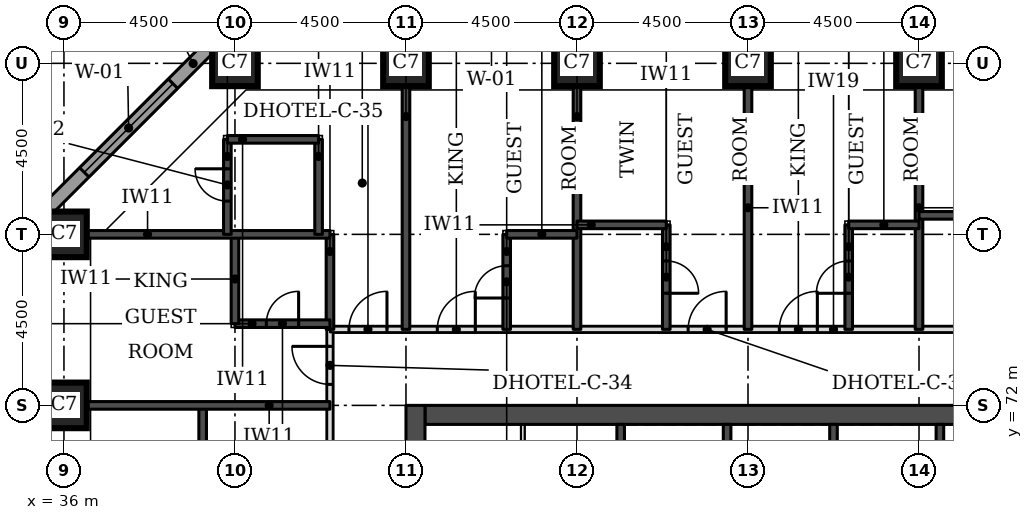
"""IFC4 building model, lengths in metres.
Left out: names, types, materials, properties, quantities, classifications, styles, units other than length and angle.
Written with IfcOpenShell. Run it as: python <this file> out.ifc"""

import sys

from ifc_helpers import new_model, si_unit, direction, frame, frame_2d, origin, origin_2d, place, context, subcontext, project, spatial, rectangle, extrude, element, fill, save


model = new_model("IFC4")
c1 = context("Model", 3, precision=1e-05, world=origin(), true_north=direction((0.0, 1.0)))
c2 = subcontext(c1, "Body", "Model", "MODEL_VIEW")
j1 = project(units=[si_unit("LENGTHUNIT", "METRE"), si_unit("PLANEANGLEUNIT", "RADIAN")], contexts=[c1])
p1 = place(None, origin())
s1 = spatial("IfcSite", under=j1, at=p1, CompositionType="ELEMENT")
p2 = place(p1, origin())
s2 = spatial("IfcBuilding", under=s1, at=p2, CompositionType="ELEMENT")
p3 = place(p2, frame((0.0, 0.0, 56.1)))
s3 = spatial("IfcBuildingStorey", under=s2, at=p3, CompositionType="ELEMENT", Elevation=56.1)
for number, where, z_axis, x_axis in (
    (1, (36.0, 72.0, 0.0), (0.0, 0.0, 1.0), (1.0, 0.0, 0.0)),
    (2, (36.0, 76.5, 0.0), (0.0, 0.0, 1.0), (1.0, 0.0, 0.0)),
    (3, (40.5, 81.0, 0.0), (0.0, 0.0, 1.0), (1.0, 0.0, 0.0)),
    (4, (45.0, 81.0, 0.0), (0.0, 0.0, 1.0), (1.0, 0.0, 0.0)),
    (5, (49.5, 81.0, 0.0), (0.0, 0.0, 1.0), (1.0, 0.0, 0.0)),
    (6, (54.0, 81.0, 0.0), (0.0, 0.0, 1.0), (1.0, 0.0, 0.0)),
    (7, (58.5, 81.0, 0.0), (0.0, 0.0, 1.0), (1.0, 0.0, 0.0)),
):
    element("IfcColumn", number, at=place(p3, frame(where, z_axis=z_axis, x_axis=x_axis)), inside=s3, PredefinedType="COLUMN", context=c2, shape_type="SweptSolid", body=[
        extrude(rectangle(XDim=1.2, YDim=1.2, at=origin_2d()), origin(), (0.0, 0.0, 1.0), 3.3),
    ])
p4 = place(p3, frame((45.5, 71.75, 0.0), z_axis=(0.0, 0.0, 1.0), x_axis=(1.0, 0.0, 0.0)))
e8 = element("IfcWall", 8, at=p4, inside=s3, PredefinedType="SHEAR", context=c2, shape_type="SweptSolid", body=[
    extrude(rectangle(XDim=21.5, YDim=0.5, at=frame_2d((10.75, 0.0))), origin(), (0.0, 0.0, 1.0), 3.3),
])
p5 = place(p3, frame((45.25, 49.5, 0.0), z_axis=(0.0, 0.0, 1.0), x_axis=(0.0, 1.0, 0.0)))
e9 = element("IfcWall", 9, at=p5, inside=s3, PredefinedType="SHEAR", context=c2, shape_type="SweptSolid", body=[
    extrude(rectangle(XDim=22.5, YDim=0.5, at=frame_2d((11.25, 0.0))), origin(), (0.0, 0.0, 1.0), 3.3),
])
p6 = place(p5, frame((4.2, 0.0, 0.0)))
e10 = element("IfcOpeningElement", 10, at=p6, cuts=e9, PredefinedType="OPENING", context=c2, shape_type="SweptSolid", body=[
    extrude(rectangle(XDim=1.8, YDim=2.1, at=frame_2d((0.9, 1.05))), frame((0.0, 0.26, 0.0), z_axis=(0.0, -1.0, 0.0), x_axis=(1.0, 0.0, 0.0)), (0.0, 0.0, 1.0), 0.52),
])
p7 = place(p5, frame((6.9, 0.0, 0.0)))
e11 = element("IfcOpeningElement", 11, at=p7, cuts=e9, PredefinedType="OPENING", context=c2, shape_type="SweptSolid", body=[
    extrude(rectangle(XDim=1.1, YDim=2.1, at=frame_2d((0.55, 1.05))), frame((0.0, 0.26, 0.0), z_axis=(0.0, -1.0, 0.0), x_axis=(1.0, 0.0, 0.0)), (0.0, 0.0, 1.0), 0.52),
])
p8 = place(p5, frame((13.6, 0.0, 0.0)))
e12 = element("IfcOpeningElement", 12, at=p8, cuts=e9, PredefinedType="OPENING", context=c2, shape_type="SweptSolid", body=[
    extrude(rectangle(XDim=1.1, YDim=2.1, at=frame_2d((0.55, 1.05))), frame((0.0, 0.26, 0.0), z_axis=(0.0, -1.0, 0.0), x_axis=(1.0, 0.0, 0.0)), (0.0, 0.0, 1.0), 0.52),
])
p9 = place(p5, frame((16.5, 0.0, 0.0)))
e13 = element("IfcOpeningElement", 13, at=p9, cuts=e9, PredefinedType="OPENING", context=c2, shape_type="SweptSolid", body=[
    extrude(rectangle(XDim=1.8, YDim=2.1, at=frame_2d((0.9, 1.05))), frame((0.0, 0.26, 0.0), z_axis=(0.0, -1.0, 0.0), x_axis=(1.0, 0.0, 0.0)), (0.0, 0.0, 1.0), 0.52),
])
p10 = place(p3, frame((40.23, 81.826, 0.0), z_axis=(0.0, 0.0, 1.0), x_axis=(-0.707106781187, -0.707106781187, 0.0)))
e14 = element("IfcWall", 14, at=p10, inside=s3, PredefinedType="STANDARD", context=c2, shape_type="SweptSolid", body=[
    extrude(rectangle(XDim=7.151, YDim=0.35, at=frame_2d((3.576, 0.0))), origin(), (0.0, 0.0, 1.0), 3.055),
])
p11 = place(p10, frame((1.926, 0.0, 0.8)))
e15 = element("IfcOpeningElement", 15, at=p11, cuts=e14, PredefinedType="OPENING", context=c2, shape_type="SweptSolid", body=[
    extrude(rectangle(XDim=3.3, YDim=1.5, at=frame_2d((1.65, 0.75))), frame((0.0, 0.185, 0.0), z_axis=(0.0, -1.0, 0.0), x_axis=(1.0, 0.0, 0.0)), (0.0, 0.0, 1.0), 0.37),
])
p12 = place(p3, frame((43.0, 56.0, 0.0), z_axis=(0.0, 0.0, 1.0), x_axis=(0.0, 1.0, 0.0)))
e16 = element("IfcWall", 16, at=p12, inside=s3, PredefinedType="PARTITIONING", context=c2, shape_type="SweptSolid", body=[
    extrude(rectangle(XDim=18.0, YDim=0.15, at=frame_2d((9.0, 0.0))), origin(), (0.0, 0.0, 1.0), 3.08),
])
p13 = place(p12, frame((9.775, 0.0, 0.0)))
e17 = element("IfcOpeningElement", 17, at=p13, cuts=e16, PredefinedType="OPENING", context=c2, shape_type="SweptSolid", body=[
    extrude(rectangle(XDim=1.0, YDim=2.1, at=frame_2d((0.5, 1.05))), frame((0.0, 0.085, 0.0), z_axis=(0.0, -1.0, 0.0), x_axis=(1.0, 0.0, 0.0)), (0.0, 0.0, 1.0), 0.17),
])
p14 = place(p12, frame((16.553, 0.0, 0.0)))
e18 = element("IfcOpeningElement", 18, at=p14, cuts=e16, PredefinedType="OPENING", context=c2, shape_type="SweptSolid", body=[
    extrude(rectangle(XDim=1.0, YDim=2.1, at=frame_2d((0.5, 1.05))), frame((0.0, 0.085, 0.0), z_axis=(0.0, -1.0, 0.0), x_axis=(1.0, 0.0, 0.0)), (0.0, 0.0, 1.0), 0.17),
])
p15 = place(p12, frame((3.05, 0.0, 0.0)))
e19 = element("IfcOpeningElement", 19, at=p15, cuts=e16, PredefinedType="OPENING", context=c2, shape_type="SweptSolid", body=[
    extrude(rectangle(XDim=0.9, YDim=2.1, at=frame_2d((0.45, 1.05))), frame((0.0, 0.085, 0.0), z_axis=(0.0, -1.0, 0.0), x_axis=(1.0, 0.0, 0.0)), (0.0, 0.0, 1.0), 0.17),
])
p16 = place(p3, frame((43.0, 74.0, 0.0), z_axis=(0.0, 0.0, 1.0), x_axis=(1.0, 0.0, 0.0)))
e20 = element("IfcWall", 20, at=p16, inside=s3, PredefinedType="PARTITIONING", context=c2, shape_type="SweptSolid", body=[
    extrude(rectangle(XDim=26.5, YDim=0.15, at=frame_2d((13.25, 0.0))), origin(), (0.0, 0.0, 1.0), 3.08),
])
p17 = place(p16, frame((2.825, 0.0, 0.0)))
e21 = element("IfcOpeningElement", 21, at=p17, cuts=e20, PredefinedType="OPENING", context=c2, shape_type="SweptSolid", body=[
    extrude(rectangle(XDim=1.0, YDim=2.1, at=frame_2d((0.5, 1.05))), frame((0.0, 0.085, 0.0), z_axis=(0.0, -1.0, 0.0), x_axis=(1.0, 0.0, 0.0)), (0.0, 0.0, 1.0), 0.17),
])
p18 = place(p16, frame((9.425, 0.0, 0.0)))
e22 = element("IfcOpeningElement", 22, at=p18, cuts=e20, PredefinedType="OPENING", context=c2, shape_type="SweptSolid", body=[
    extrude(rectangle(XDim=1.0, YDim=2.1, at=frame_2d((0.5, 1.05))), frame((0.0, 0.085, 0.0), z_axis=(0.0, -1.0, 0.0), x_axis=(1.0, 0.0, 0.0)), (0.0, 0.0, 1.0), 0.17),
])
p19 = place(p16, frame((11.825, 0.0, 0.0)))
e23 = element("IfcOpeningElement", 23, at=p19, cuts=e20, PredefinedType="OPENING", context=c2, shape_type="SweptSolid", body=[
    extrude(rectangle(XDim=1.0, YDim=2.1, at=frame_2d((0.5, 1.05))), frame((0.0, 0.085, 0.0), z_axis=(0.0, -1.0, 0.0), x_axis=(1.0, 0.0, 0.0)), (0.0, 0.0, 1.0), 0.17),
])
p20 = place(p16, frame((18.425, 0.0, 0.0)))
e24 = element("IfcOpeningElement", 24, at=p20, cuts=e20, PredefinedType="OPENING", context=c2, shape_type="SweptSolid", body=[
    extrude(rectangle(XDim=1.0, YDim=2.1, at=frame_2d((0.5, 1.05))), frame((0.0, 0.085, 0.0), z_axis=(0.0, -1.0, 0.0), x_axis=(1.0, 0.0, 0.0)), (0.0, 0.0, 1.0), 0.17),
])
p21 = place(p16, frame((20.825, 0.0, 0.0)))
e25 = element("IfcOpeningElement", 25, at=p21, cuts=e20, PredefinedType="OPENING", context=c2, shape_type="SweptSolid", body=[
    extrude(rectangle(XDim=1.0, YDim=2.1, at=frame_2d((0.5, 1.05))), frame((0.0, 0.085, 0.0), z_axis=(0.0, -1.0, 0.0), x_axis=(1.0, 0.0, 0.0)), (0.0, 0.0, 1.0), 0.17),
])
p22 = place(p16, frame((0.5, 0.0, 0.0)))
e26 = element("IfcOpeningElement", 26, at=p22, cuts=e20, PredefinedType="OPENING", context=c2, shape_type="SweptSolid", body=[
    extrude(rectangle(XDim=1.0, YDim=2.1, at=frame_2d((0.5, 1.05))), frame((0.0, 0.085, 0.0), z_axis=(0.0, -1.0, 0.0), x_axis=(1.0, 0.0, 0.0)), (0.0, 0.0, 1.0), 0.17),
])
p23 = place(p16, frame((25.0, 0.0, 0.0)))
e27 = element("IfcOpeningElement", 27, at=p23, cuts=e20, PredefinedType="OPENING", context=c2, shape_type="SweptSolid", body=[
    extrude(rectangle(XDim=1.0, YDim=2.1, at=frame_2d((0.5, 1.05))), frame((0.0, 0.085, 0.0), z_axis=(0.0, -1.0, 0.0), x_axis=(1.0, 0.0, 0.0)), (0.0, 0.0, 1.0), 0.17),
])
p24 = place(p3, frame((39.65, 69.55, 0.0), z_axis=(0.0, 0.0, 1.0), x_axis=(0.0, 1.0, 0.0)))
e28 = element("IfcWall", 28, at=p24, inside=s3, PredefinedType="SOLIDWALL", context=c2, shape_type="SweptSolid", body=[
    extrude(rectangle(XDim=2.45, YDim=0.2, at=frame_2d((1.225, 0.0))), origin(), (0.0, 0.0, 1.0), 3.08),
])
p25 = place(p3, frame((36.6, 72.0, 0.0), z_axis=(0.0, 0.0, 1.0), x_axis=(1.0, 0.0, 0.0)))
e29 = element("IfcWall", 29, at=p25, inside=s3, PredefinedType="SOLIDWALL", context=c2, shape_type="SweptSolid", body=[
    extrude(rectangle(XDim=6.4, YDim=0.2, at=frame_2d((3.2, 0.0))), origin(), (0.0, 0.0, 1.0), 3.08),
])
p26 = place(p3, frame((43.0, 74.0, 0.0), z_axis=(0.0, 0.0, 1.0), x_axis=(0.0, 1.0, 0.0)))
e30 = element("IfcWall", 30, at=p26, inside=s3, PredefinedType="SOLIDWALL", context=c2, shape_type="SweptSolid", body=[
    extrude(rectangle(XDim=2.5, YDim=0.2, at=frame_2d((1.25, 0.0))), origin(), (0.0, 0.0, 1.0), 3.08),
])
p27 = place(p3, frame((45.0, 74.0, 0.0), z_axis=(0.0, 0.0, 1.0), x_axis=(0.0, 1.0, 0.0)))
e31 = element("IfcWall", 31, at=p27, inside=s3, PredefinedType="SOLIDWALL", context=c2, shape_type="SweptSolid", body=[
    extrude(rectangle(XDim=6.4, YDim=0.2, at=frame_2d((3.2, 0.0))), origin(), (0.0, 0.0, 1.0), 3.08),
])
p28 = place(p3, frame((47.65, 74.0, 0.0), z_axis=(0.0, 0.0, 1.0), x_axis=(0.0, 1.0, 0.0)))
e32 = element("IfcWall", 32, at=p28, inside=s3, PredefinedType="SOLIDWALL", context=c2, shape_type="SweptSolid", body=[
    extrude(rectangle(XDim=2.5, YDim=0.2, at=frame_2d((1.25, 0.0))), origin(), (0.0, 0.0, 1.0), 3.08),
])
p29 = place(p28, frame((0.825, 0.0, 0.0)))
e33 = element("IfcOpeningElement", 33, at=p29, cuts=e32, PredefinedType="OPENING", context=c2, shape_type="SweptSolid", body=[
    extrude(rectangle(XDim=0.85, YDim=2.1, at=frame_2d((0.425, 1.05))), frame((0.0, 0.11, 0.0), z_axis=(0.0, -1.0, 0.0), x_axis=(1.0, 0.0, 0.0)), (0.0, 0.0, 1.0), 0.22),
])
p30 = place(p3, frame((49.5, 74.0, 0.0), z_axis=(0.0, 0.0, 1.0), x_axis=(0.0, 1.0, 0.0)))
e34 = element("IfcWall", 34, at=p30, inside=s3, PredefinedType="SOLIDWALL", context=c2, shape_type="SweptSolid", body=[
    extrude(rectangle(XDim=6.4, YDim=0.2, at=frame_2d((3.2, 0.0))), origin(), (0.0, 0.0, 1.0), 3.08),
])
p31 = place(p3, frame((51.85, 74.0, 0.0), z_axis=(0.0, 0.0, 1.0), x_axis=(0.0, 1.0, 0.0)))
e35 = element("IfcWall", 35, at=p31, inside=s3, PredefinedType="SOLIDWALL", context=c2, shape_type="SweptSolid", body=[
    extrude(rectangle(XDim=2.75, YDim=0.2, at=frame_2d((1.375, 0.0))), origin(), (0.0, 0.0, 1.0), 3.08),
])
p32 = place(p31, frame((0.95, 0.0, 0.0)))
e36 = element("IfcOpeningElement", 36, at=p32, cuts=e35, PredefinedType="OPENING", context=c2, shape_type="SweptSolid", body=[
    extrude(rectangle(XDim=0.85, YDim=2.1, at=frame_2d((0.425, 1.05))), frame((0.0, 0.11, 0.0), z_axis=(0.0, -1.0, 0.0), x_axis=(1.0, 0.0, 0.0)), (0.0, 0.0, 1.0), 0.22),
])
p33 = place(p3, frame((54.0, 74.0, 0.0), z_axis=(0.0, 0.0, 1.0), x_axis=(0.0, 1.0, 0.0)))
e37 = element("IfcWall", 37, at=p33, inside=s3, PredefinedType="SOLIDWALL", context=c2, shape_type="SweptSolid", body=[
    extrude(rectangle(XDim=6.4, YDim=0.2, at=frame_2d((3.2, 0.0))), origin(), (0.0, 0.0, 1.0), 3.08),
])
p34 = place(p3, frame((56.65, 74.0, 0.0), z_axis=(0.0, 0.0, 1.0), x_axis=(0.0, 1.0, 0.0)))
e38 = element("IfcWall", 38, at=p34, inside=s3, PredefinedType="SOLIDWALL", context=c2, shape_type="SweptSolid", body=[
    extrude(rectangle(XDim=2.75, YDim=0.2, at=frame_2d((1.375, 0.0))), origin(), (0.0, 0.0, 1.0), 3.08),
])
p35 = place(p34, frame((0.95, 0.0, 0.0)))
e39 = element("IfcOpeningElement", 39, at=p35, cuts=e38, PredefinedType="OPENING", context=c2, shape_type="SweptSolid", body=[
    extrude(rectangle(XDim=0.85, YDim=2.1, at=frame_2d((0.425, 1.05))), frame((0.0, 0.11, 0.0), z_axis=(0.0, -1.0, 0.0), x_axis=(1.0, 0.0, 0.0)), (0.0, 0.0, 1.0), 0.22),
])
p36 = place(p3, frame((58.5, 74.0, 0.0), z_axis=(0.0, 0.0, 1.0), x_axis=(0.0, 1.0, 0.0)))
e40 = element("IfcWall", 40, at=p36, inside=s3, PredefinedType="SOLIDWALL", context=c2, shape_type="SweptSolid", body=[
    extrude(rectangle(XDim=6.4, YDim=0.2, at=frame_2d((3.2, 0.0))), origin(), (0.0, 0.0, 1.0), 3.08),
])
p37 = place(p3, frame((40.5, 74.15, 0.0), z_axis=(0.0, 0.0, 1.0), x_axis=(1.0, 0.0, 0.0)))
e41 = element("IfcWall", 41, at=p37, inside=s3, PredefinedType="SOLIDWALL", context=c2, shape_type="SweptSolid", body=[
    extrude(rectangle(XDim=2.5, YDim=0.2, at=frame_2d((1.25, 0.0))), origin(), (0.0, 0.0, 1.0), 3.08),
])
p38 = place(p37, frame((0.825, 0.0, 0.0)))
e42 = element("IfcOpeningElement", 42, at=p38, cuts=e41, PredefinedType="OPENING", context=c2, shape_type="SweptSolid", body=[
    extrude(rectangle(XDim=0.85, YDim=2.1, at=frame_2d((0.425, 1.05))), frame((0.0, 0.11, 0.0), z_axis=(0.0, -1.0, 0.0), x_axis=(1.0, 0.0, 0.0)), (0.0, 0.0, 1.0), 0.22),
])
p39 = place(p3, frame((40.5, 74.15, 0.0), z_axis=(0.0, 0.0, 1.0), x_axis=(0.0, 1.0, 0.0)))
e43 = element("IfcWall", 43, at=p39, inside=s3, PredefinedType="SOLIDWALL", context=c2, shape_type="SweptSolid", body=[
    extrude(rectangle(XDim=2.35, YDim=0.2, at=frame_2d((1.175, 0.0))), origin(), (0.0, 0.0, 1.0), 3.08),
])
p40 = place(p3, frame((36.6, 76.5, 0.0), z_axis=(0.0, 0.0, 1.0), x_axis=(1.0, 0.0, 0.0)))
e44 = element("IfcWall", 44, at=p40, inside=s3, PredefinedType="SOLIDWALL", context=c2, shape_type="SweptSolid", body=[
    extrude(rectangle(XDim=6.4, YDim=0.2, at=frame_2d((3.2, 0.0))), origin(), (0.0, 0.0, 1.0), 3.08),
])
p41 = place(p3, frame((40.3, 76.5, 0.0), z_axis=(0.0, 0.0, 1.0), x_axis=(0.0, 1.0, 0.0)))
e45 = element("IfcWall", 45, at=p41, inside=s3, PredefinedType="SOLIDWALL", context=c2, shape_type="SweptSolid", body=[
    extrude(rectangle(XDim=2.5, YDim=0.2, at=frame_2d((1.25, 0.0))), origin(), (0.0, 0.0, 1.0), 3.08),
])
p42 = place(p41, frame((0.875, 0.0, 0.0)))
e46 = element("IfcOpeningElement", 46, at=p42, cuts=e45, PredefinedType="OPENING", context=c2, shape_type="SweptSolid", body=[
    extrude(rectangle(XDim=0.85, YDim=2.1, at=frame_2d((0.425, 1.05))), frame((0.0, 0.11, 0.0), z_axis=(0.0, -1.0, 0.0), x_axis=(1.0, 0.0, 0.0)), (0.0, 0.0, 1.0), 0.22),
])
p43 = place(p3, frame((42.7, 76.5, 0.0), z_axis=(0.0, 0.0, 1.0), x_axis=(0.0, 1.0, 0.0)))
e47 = element("IfcWall", 47, at=p43, inside=s3, PredefinedType="SOLIDWALL", context=c2, shape_type="SweptSolid", body=[
    extrude(rectangle(XDim=2.5, YDim=0.2, at=frame_2d((1.25, 0.0))), origin(), (0.0, 0.0, 1.0), 3.08),
])
p44 = place(p3, frame((47.65, 76.5, 0.0), z_axis=(0.0, 0.0, 1.0), x_axis=(1.0, 0.0, 0.0)))
e48 = element("IfcWall", 48, at=p44, inside=s3, PredefinedType="SOLIDWALL", context=c2, shape_type="SweptSolid", body=[
    extrude(rectangle(XDim=1.85, YDim=0.2, at=frame_2d((0.925, 0.0))), origin(), (0.0, 0.0, 1.0), 3.08),
])
p45 = place(p3, frame((49.5, 76.75, 0.0), z_axis=(0.0, 0.0, 1.0), x_axis=(1.0, 0.0, 0.0)))
e49 = element("IfcWall", 49, at=p45, inside=s3, PredefinedType="SOLIDWALL", context=c2, shape_type="SweptSolid", body=[
    extrude(rectangle(XDim=2.35, YDim=0.2, at=frame_2d((1.175, 0.0))), origin(), (0.0, 0.0, 1.0), 3.08),
])
p46 = place(p3, frame((56.65, 76.75, 0.0), z_axis=(0.0, 0.0, 1.0), x_axis=(1.0, 0.0, 0.0)))
e50 = element("IfcWall", 50, at=p46, inside=s3, PredefinedType="SOLIDWALL", context=c2, shape_type="SweptSolid", body=[
    extrude(rectangle(XDim=1.85, YDim=0.2, at=frame_2d((0.925, 0.0))), origin(), (0.0, 0.0, 1.0), 3.08),
])
p47 = place(p3, frame((58.5, 77.0, 0.0), z_axis=(0.0, 0.0, 1.0), x_axis=(1.0, 0.0, 0.0)))
e51 = element("IfcWall", 51, at=p47, inside=s3, PredefinedType="SOLIDWALL", context=c2, shape_type="SweptSolid", body=[
    extrude(rectangle(XDim=2.35, YDim=0.2, at=frame_2d((1.175, 0.0))), origin(), (0.0, 0.0, 1.0), 3.08),
])
p48 = place(p3, frame((40.3, 79.0, 0.0), z_axis=(0.0, 0.0, 1.0), x_axis=(1.0, 0.0, 0.0)))
e52 = element("IfcWall", 52, at=p48, inside=s3, PredefinedType="SOLIDWALL", context=c2, shape_type="SweptSolid", body=[
    extrude(rectangle(XDim=2.4, YDim=0.2, at=frame_2d((1.2, 0.0))), origin(), (0.0, 0.0, 1.0), 3.08),
])
p49 = place(p3, frame((48.075, 68.5, 0.0), z_axis=(0.0, 0.0, 1.0), x_axis=(0.0, 1.0, 0.0)))
e53 = element("IfcWall", 53, at=p49, inside=s3, PredefinedType="PARTITIONING", context=c2, shape_type="SweptSolid", body=[
    extrude(rectangle(XDim=3.0, YDim=0.1, at=frame_2d((1.5, 0.0))), origin(), (0.0, 0.0, 1.0), 3.08),
])
for number, where, z_axis, x_axis in (
    (54, (50.65, 68.5, 0.0), (0.0, 0.0, 1.0), (0.0, 1.0, 0.0)),
    (55, (53.45, 68.5, 0.0), (0.0, 0.0, 1.0), (0.0, 1.0, 0.0)),
    (56, (56.25, 68.5, 0.0), (0.0, 0.0, 1.0), (0.0, 1.0, 0.0)),
    (57, (59.05, 68.5, 0.0), (0.0, 0.0, 1.0), (0.0, 1.0, 0.0)),
):
    element("IfcWall", number, at=place(p3, frame(where, z_axis=z_axis, x_axis=x_axis)), inside=s3, PredefinedType="SOLIDWALL", context=c2, shape_type="SweptSolid", body=[
        extrude(rectangle(XDim=3.0, YDim=0.2, at=frame_2d((1.5, 0.0))), origin(), (0.0, 0.0, 1.0), 3.08),
    ])
p50 = place(p11, origin())
e58 = element("IfcWindow", 58, at=p50, inside=s3, PartitioningType="SINGLE_PANEL", PredefinedType="WINDOW", context=c2, shape_type="SweptSolid", body=[
    extrude(rectangle(XDim=3.3, YDim=1.5, at=frame_2d((1.65, 0.75))), frame((0.0, 0.085, 0.0), z_axis=(0.0, -1.0, 0.0), x_axis=(1.0, 0.0, 0.0)), (0.0, 0.0, 1.0), 0.06),
])
fill(e15, e58)
p51 = place(p14, origin())
e59 = element("IfcDoor", 59, at=p51, inside=s3, OperationType="SINGLE_SWING_RIGHT", PredefinedType="DOOR", context=c2, shape_type="SweptSolid", body=[
    extrude(rectangle(XDim=1.0, YDim=2.1, at=frame_2d((0.5, 1.05))), frame((0.0, 0.025, 0.0), z_axis=(0.0, -1.0, 0.0), x_axis=(1.0, 0.0, 0.0)), (0.0, 0.0, 1.0), 0.05),
])
fill(e18, e59)
p52 = place(p38, origin())
e60 = element("IfcDoor", 60, at=p52, inside=s3, OperationType="SINGLE_SWING_RIGHT", PredefinedType="DOOR", context=c2, shape_type="SweptSolid", body=[
    extrude(rectangle(XDim=0.85, YDim=2.1, at=frame_2d((0.425, 1.05))), frame((0.0, 0.025, 0.0), z_axis=(0.0, -1.0, 0.0), x_axis=(1.0, 0.0, 0.0)), (0.0, 0.0, 1.0), 0.05),
])
fill(e42, e60)
p53 = place(p17, origin())
e61 = element("IfcDoor", 61, at=p53, inside=s3, OperationType="SINGLE_SWING_RIGHT", PredefinedType="DOOR", context=c2, shape_type="SweptSolid", body=[
    extrude(rectangle(XDim=1.0, YDim=2.1, at=frame_2d((0.5, 1.05))), frame((0.0, 0.025, 0.0), z_axis=(0.0, -1.0, 0.0), x_axis=(1.0, 0.0, 0.0)), (0.0, 0.0, 1.0), 0.05),
])
fill(e21, e61)
p54 = place(p29, origin())
e62 = element("IfcDoor", 62, at=p54, inside=s3, OperationType="SINGLE_SWING_LEFT", PredefinedType="DOOR", context=c2, shape_type="SweptSolid", body=[
    extrude(rectangle(XDim=0.85, YDim=2.1, at=frame_2d((0.425, 1.05))), frame((0.0, 0.025, 0.0), z_axis=(0.0, -1.0, 0.0), x_axis=(1.0, 0.0, 0.0)), (0.0, 0.0, 1.0), 0.05),
])
fill(e33, e62)
p55 = place(p18, origin())
e63 = element("IfcDoor", 63, at=p55, inside=s3, OperationType="SINGLE_SWING_RIGHT", PredefinedType="DOOR", context=c2, shape_type="SweptSolid", body=[
    extrude(rectangle(XDim=1.0, YDim=2.1, at=frame_2d((0.5, 1.05))), frame((0.0, 0.025, 0.0), z_axis=(0.0, -1.0, 0.0), x_axis=(1.0, 0.0, 0.0)), (0.0, 0.0, 1.0), 0.05),
])
fill(e22, e63)
p56 = place(p32, frame((0.85, 0.0, 0.0), z_axis=(0.0, 0.0, 1.0), x_axis=(-1.0, 0.0, 0.0)))
e64 = element("IfcDoor", 64, at=p56, inside=s3, OperationType="SINGLE_SWING_RIGHT", PredefinedType="DOOR", context=c2, shape_type="SweptSolid", body=[
    extrude(rectangle(XDim=0.85, YDim=2.1, at=frame_2d((0.425, 1.05))), frame((0.0, 0.025, 0.0), z_axis=(0.0, -1.0, 0.0), x_axis=(1.0, 0.0, 0.0)), (0.0, 0.0, 1.0), 0.05),
])
fill(e36, e64)
p57 = place(p19, origin())
e65 = element("IfcDoor", 65, at=p57, inside=s3, OperationType="SINGLE_SWING_RIGHT", PredefinedType="DOOR", context=c2, shape_type="SweptSolid", body=[
    extrude(rectangle(XDim=1.0, YDim=2.1, at=frame_2d((0.5, 1.05))), frame((0.0, 0.025, 0.0), z_axis=(0.0, -1.0, 0.0), x_axis=(1.0, 0.0, 0.0)), (0.0, 0.0, 1.0), 0.05),
])
fill(e23, e65)
p58 = place(p35, origin())
e66 = element("IfcDoor", 66, at=p58, inside=s3, OperationType="SINGLE_SWING_LEFT", PredefinedType="DOOR", context=c2, shape_type="SweptSolid", body=[
    extrude(rectangle(XDim=0.85, YDim=2.1, at=frame_2d((0.425, 1.05))), frame((0.0, 0.025, 0.0), z_axis=(0.0, -1.0, 0.0), x_axis=(1.0, 0.0, 0.0)), (0.0, 0.0, 1.0), 0.05),
])
fill(e39, e66)
p59 = place(p22, origin())
e67 = element("IfcDoor", 67, at=p59, inside=s3, OperationType="SINGLE_SWING_RIGHT", PredefinedType="DOOR", context=c2, shape_type="SweptSolid", body=[
    extrude(rectangle(XDim=1.0, YDim=2.1, at=frame_2d((0.5, 1.05))), frame((0.0, 0.025, 0.0), z_axis=(0.0, -1.0, 0.0), x_axis=(1.0, 0.0, 0.0)), (0.0, 0.0, 1.0), 0.05),
])
fill(e26, e67)
p60 = place(p42, origin())
e68 = element("IfcDoor", 68, at=p60, inside=s3, OperationType="SINGLE_SWING_RIGHT", PredefinedType="DOOR", context=c2, shape_type="SweptSolid", body=[
    extrude(rectangle(XDim=0.85, YDim=2.1, at=frame_2d((0.425, 1.05))), frame((0.0, 0.025, 0.0), z_axis=(0.0, -1.0, 0.0), x_axis=(1.0, 0.0, 0.0)), (0.0, 0.0, 1.0), 0.05),
])
fill(e46, e68)
save(model, sys.argv[1])
